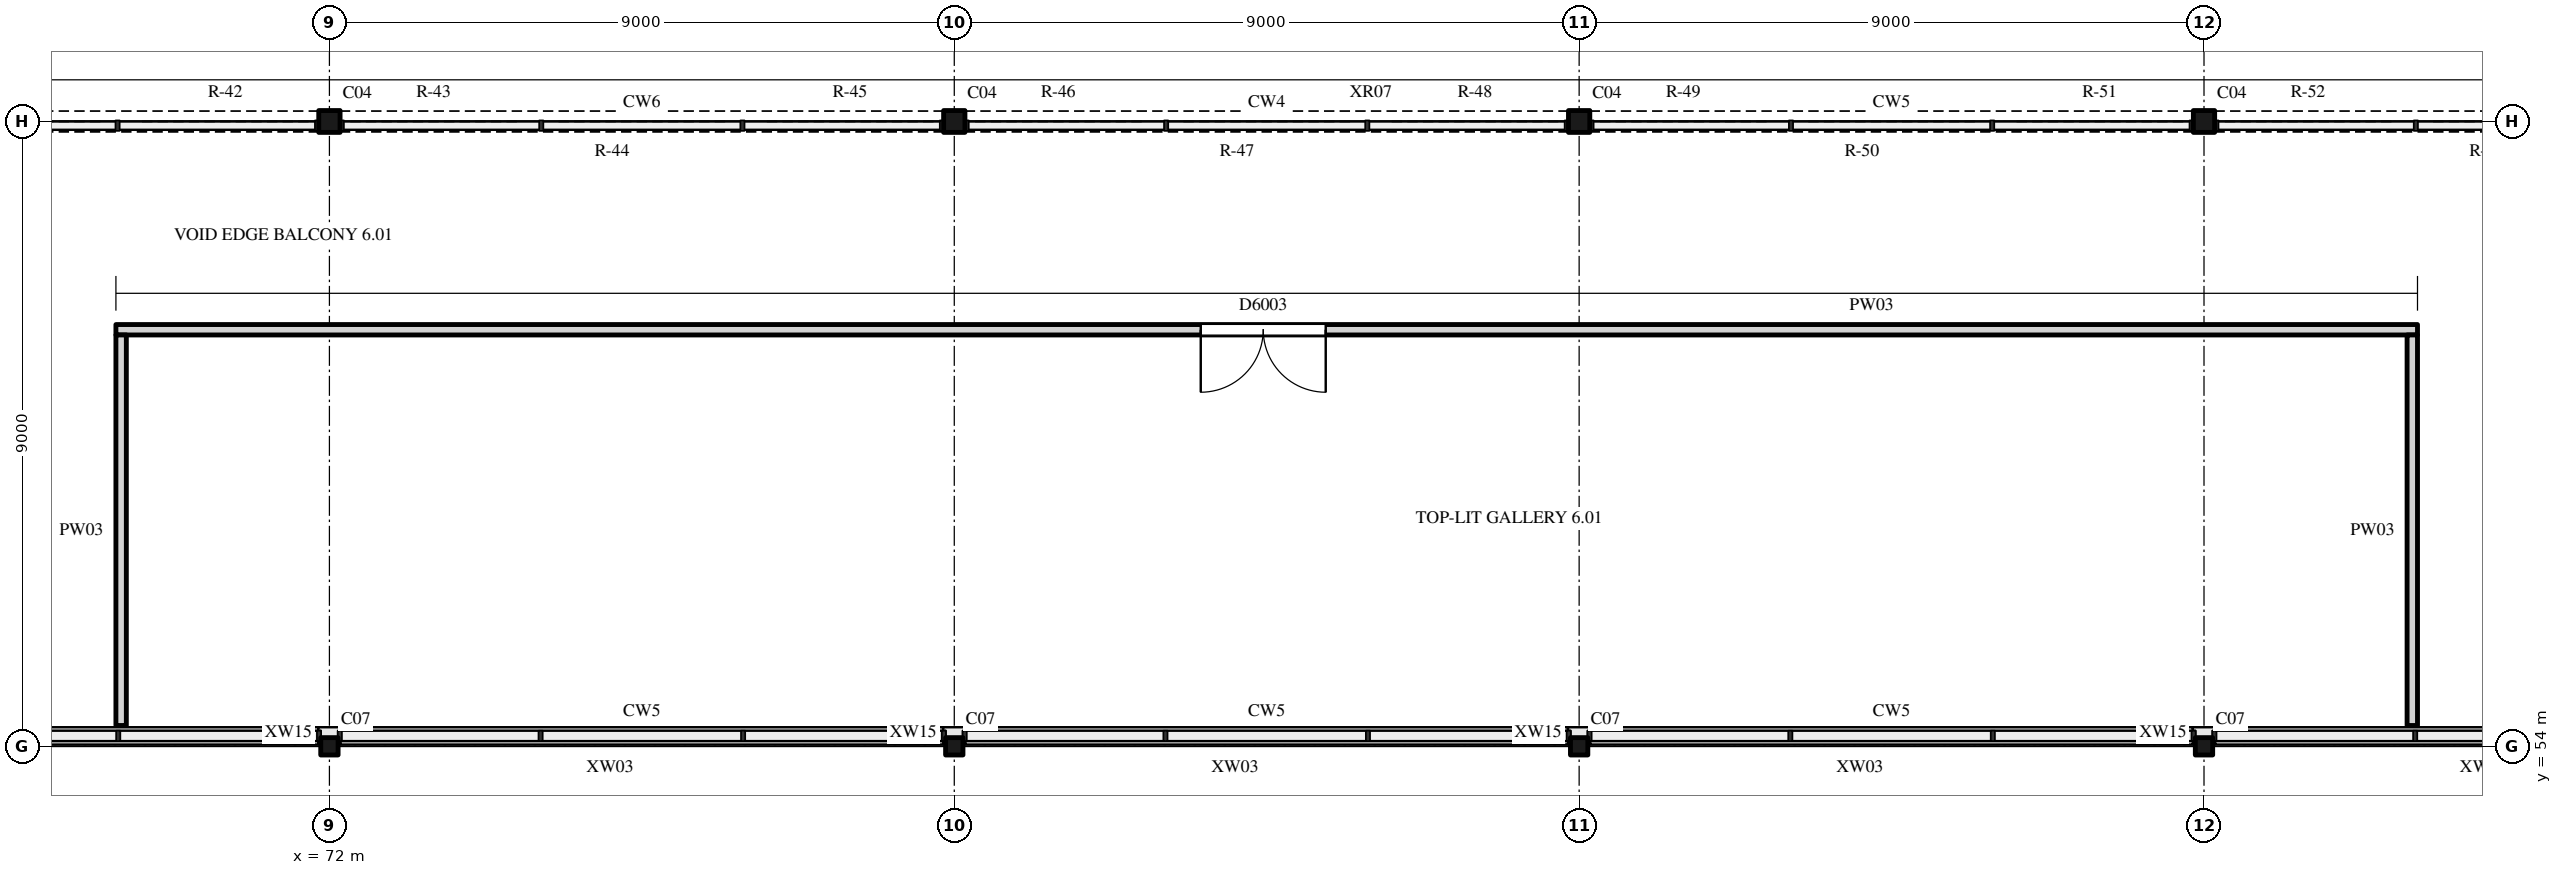
"""IFC4 building model, lengths in metres.
Left out: names, types, materials, properties, quantities, classifications, styles, units other than length and angle.
Written with IfcOpenShell. Run it as: python <this file> out.ifc"""

import sys

from ifc_helpers import new_model, si_unit, direction, frame, frame_2d, origin, origin_2d, place, context, subcontext, project, spatial, rectangle, hollow_rectangle, i_section, extrude, element, fill, save


model = new_model("IFC4")
c1 = context("Model", 3, precision=1e-05, world=origin(), true_north=direction((0.0, 1.0)))
c2 = subcontext(c1, "Body", "Model", "MODEL_VIEW")
j1 = project(units=[si_unit("LENGTHUNIT", "METRE"), si_unit("PLANEANGLEUNIT", "RADIAN")], contexts=[c1])
p1 = place(None, origin())
s1 = spatial("IfcSite", under=j1, at=p1, CompositionType="ELEMENT")
p2 = place(p1, origin())
s2 = spatial("IfcBuilding", under=s1, at=p2, CompositionType="ELEMENT")
p3 = place(p2, frame((0.0, 0.0, 36.0)))
s3 = spatial("IfcBuildingStorey", under=s2, at=p3, CompositionType="ELEMENT", Elevation=36.0)
for number, where, z_axis, x_axis in (
    (1, (72.0, 54.0, 0.0), (0.0, 0.0, 1.0), (1.0, 0.0, 0.0)),
    (2, (81.0, 54.0, 0.0), (0.0, 0.0, 1.0), (1.0, 0.0, 0.0)),
    (3, (90.0, 54.0, 0.0), (0.0, 0.0, 1.0), (1.0, 0.0, 0.0)),
    (4, (99.0, 54.0, 0.0), (0.0, 0.0, 1.0), (1.0, 0.0, 0.0)),
):
    element("IfcColumn", number, at=place(p3, frame(where, z_axis=z_axis, x_axis=x_axis)), inside=s3, PredefinedType="COLUMN", context=c2, shape_type="SweptSolid", body=[
        extrude(hollow_rectangle(XDim=0.25, YDim=0.25, WallThickness=0.009, InnerFilletRadius=0.013, OuterFilletRadius=0.022, at=origin_2d()), origin(), (0.0, 0.0, 1.0), 8.0),
    ])
for number, where, z_axis, x_axis in (
    (5, (72.0, 63.0, 0.0), (0.0, 0.0, 1.0), (1.0, 0.0, 0.0)),
    (6, (81.0, 63.0, 0.0), (0.0, 0.0, 1.0), (1.0, 0.0, 0.0)),
    (7, (90.0, 63.0, 0.0), (0.0, 0.0, 1.0), (1.0, 0.0, 0.0)),
    (8, (99.0, 63.0, 0.0), (0.0, 0.0, 1.0), (1.0, 0.0, 0.0)),
):
    element("IfcColumn", number, at=place(p3, frame(where, z_axis=z_axis, x_axis=x_axis)), inside=s3, PredefinedType="COLUMN", context=c2, shape_type="SweptSolid", body=[
        extrude(i_section(OverallWidth=0.307, OverallDepth=0.315, WebThickness=0.012, FlangeThickness=0.019, FilletRadius=0.017, at=origin_2d()), origin(), (0.0, 0.0, 1.0), 8.0),
    ])
p4 = place(p3, frame((63.197, 54.15, 0.0), z_axis=(0.0, 0.0, 1.0), x_axis=(1.0, 0.0, 0.0)))
e9 = element("IfcWall", 9, at=p4, inside=s3, PredefinedType="SOLIDWALL", context=c2, shape_type="SweptSolid", body=[
    extrude(rectangle(XDim=8.642, YDim=0.25, at=frame_2d((4.321, 0.0))), origin(), (0.0, 0.0, 1.0), 1.1),
])
for number, where, z_axis, x_axis in (
    (10, (72.161, 54.15, 0.0), (0.0, 0.0, 1.0), (1.0, 0.0, 0.0)),
    (11, (81.161, 54.15, 0.0), (0.0, 0.0, 1.0), (1.0, 0.0, 0.0)),
    (12, (90.161, 54.15, 0.0), (0.0, 0.0, 1.0), (1.0, 0.0, 0.0)),
):
    element("IfcWall", number, at=place(p3, frame(where, z_axis=z_axis, x_axis=x_axis)), inside=s3, PredefinedType="SOLIDWALL", context=c2, shape_type="SweptSolid", body=[
        extrude(rectangle(XDim=8.678, YDim=0.25, at=frame_2d((4.339, 0.0))), origin(), (0.0, 0.0, 1.0), 1.1),
    ])
p5 = place(p3, frame((99.161, 54.15, 0.0), z_axis=(0.0, 0.0, 1.0), x_axis=(1.0, 0.0, 0.0)))
e13 = element("IfcWall", 13, at=p5, inside=s3, PredefinedType="SOLIDWALL", context=c2, shape_type="SweptSolid", body=[
    extrude(rectangle(XDim=8.642, YDim=0.25, at=frame_2d((4.321, 0.0))), origin(), (0.0, 0.0, 1.0), 1.1),
])
for number, where, z_axis, x_axis in (
    (14, (71.839, 54.2, 0.0), (0.0, 0.0, 1.0), (1.0, 0.0, 0.0)),
    (15, (80.839, 54.2, 0.0), (0.0, 0.0, 1.0), (1.0, 0.0, 0.0)),
    (16, (89.839, 54.2, 0.0), (0.0, 0.0, 1.0), (1.0, 0.0, 0.0)),
    (17, (98.839, 54.2, 0.0), (0.0, 0.0, 1.0), (1.0, 0.0, 0.0)),
):
    element("IfcWall", number, at=place(p3, frame(where, z_axis=z_axis, x_axis=x_axis)), inside=s3, PredefinedType="SOLIDWALL", context=c2, shape_type="SweptSolid", body=[
        extrude(rectangle(XDim=0.322, YDim=0.15, at=frame_2d((0.161, 0.0))), origin(), (0.0, 0.0, 1.0), 1.1),
    ])
p6 = place(p3, frame((54.15, 63.0, 15.2), z_axis=(0.0, 0.0, 1.0), x_axis=(1.0, 0.0, 0.0)))
e18 = element("IfcWall", 18, at=p6, inside=s3, PredefinedType="SOLIDWALL", context=c2, shape_type="SweptSolid", body=[
    extrude(rectangle(XDim=62.7, YDim=0.3, at=frame_2d((31.35, 0.0))), origin(), (0.0, 0.0, 1.0), 0.9),
])
p7 = place(p6, frame((0.15, 0.0, 0.15)))
e19 = element("IfcOpeningElement", 19, at=p7, cuts=e18, PredefinedType="OPENING", context=c2, shape_type="SweptSolid", body=[
    extrude(rectangle(XDim=2.4, YDim=0.6, at=frame_2d((1.2, 0.3))), frame((0.0, 0.16, 0.0), z_axis=(0.0, -1.0, 0.0), x_axis=(1.0, 0.0, 0.0)), (0.0, 0.0, 1.0), 0.32),
])
p8 = place(p6, frame((3.15, 0.0, 0.15)))
e20 = element("IfcOpeningElement", 20, at=p8, cuts=e18, PredefinedType="OPENING", context=c2, shape_type="SweptSolid", body=[
    extrude(rectangle(XDim=2.4, YDim=0.6, at=frame_2d((1.2, 0.3))), frame((0.0, 0.16, 0.0), z_axis=(0.0, -1.0, 0.0), x_axis=(1.0, 0.0, 0.0)), (0.0, 0.0, 1.0), 0.32),
])
p9 = place(p6, frame((6.15, 0.0, 0.15)))
e21 = element("IfcOpeningElement", 21, at=p9, cuts=e18, PredefinedType="OPENING", context=c2, shape_type="SweptSolid", body=[
    extrude(rectangle(XDim=2.4, YDim=0.6, at=frame_2d((1.2, 0.3))), frame((0.0, 0.16, 0.0), z_axis=(0.0, -1.0, 0.0), x_axis=(1.0, 0.0, 0.0)), (0.0, 0.0, 1.0), 0.32),
])
p10 = place(p6, frame((9.15, 0.0, 0.15)))
e22 = element("IfcOpeningElement", 22, at=p10, cuts=e18, PredefinedType="OPENING", context=c2, shape_type="SweptSolid", body=[
    extrude(rectangle(XDim=2.4, YDim=0.6, at=frame_2d((1.2, 0.3))), frame((0.0, 0.16, 0.0), z_axis=(0.0, -1.0, 0.0), x_axis=(1.0, 0.0, 0.0)), (0.0, 0.0, 1.0), 0.32),
])
p11 = place(p6, frame((12.15, 0.0, 0.15)))
e23 = element("IfcOpeningElement", 23, at=p11, cuts=e18, PredefinedType="OPENING", context=c2, shape_type="SweptSolid", body=[
    extrude(rectangle(XDim=2.4, YDim=0.6, at=frame_2d((1.2, 0.3))), frame((0.0, 0.16, 0.0), z_axis=(0.0, -1.0, 0.0), x_axis=(1.0, 0.0, 0.0)), (0.0, 0.0, 1.0), 0.32),
])
p12 = place(p6, frame((15.15, 0.0, 0.15)))
e24 = element("IfcOpeningElement", 24, at=p12, cuts=e18, PredefinedType="OPENING", context=c2, shape_type="SweptSolid", body=[
    extrude(rectangle(XDim=2.4, YDim=0.6, at=frame_2d((1.2, 0.3))), frame((0.0, 0.16, 0.0), z_axis=(0.0, -1.0, 0.0), x_axis=(1.0, 0.0, 0.0)), (0.0, 0.0, 1.0), 0.32),
])
p13 = place(p6, frame((18.15, 0.0, 0.15)))
e25 = element("IfcOpeningElement", 25, at=p13, cuts=e18, PredefinedType="OPENING", context=c2, shape_type="SweptSolid", body=[
    extrude(rectangle(XDim=2.4, YDim=0.6, at=frame_2d((1.2, 0.3))), frame((0.0, 0.16, 0.0), z_axis=(0.0, -1.0, 0.0), x_axis=(1.0, 0.0, 0.0)), (0.0, 0.0, 1.0), 0.32),
])
p14 = place(p6, frame((21.15, 0.0, 0.15)))
e26 = element("IfcOpeningElement", 26, at=p14, cuts=e18, PredefinedType="OPENING", context=c2, shape_type="SweptSolid", body=[
    extrude(rectangle(XDim=2.4, YDim=0.6, at=frame_2d((1.2, 0.3))), frame((0.0, 0.16, 0.0), z_axis=(0.0, -1.0, 0.0), x_axis=(1.0, 0.0, 0.0)), (0.0, 0.0, 1.0), 0.32),
])
p15 = place(p6, frame((24.15, 0.0, 0.15)))
e27 = element("IfcOpeningElement", 27, at=p15, cuts=e18, PredefinedType="OPENING", context=c2, shape_type="SweptSolid", body=[
    extrude(rectangle(XDim=2.4, YDim=0.6, at=frame_2d((1.2, 0.3))), frame((0.0, 0.16, 0.0), z_axis=(0.0, -1.0, 0.0), x_axis=(1.0, 0.0, 0.0)), (0.0, 0.0, 1.0), 0.32),
])
p16 = place(p6, frame((27.15, 0.0, 0.15)))
e28 = element("IfcOpeningElement", 28, at=p16, cuts=e18, PredefinedType="OPENING", context=c2, shape_type="SweptSolid", body=[
    extrude(rectangle(XDim=2.4, YDim=0.6, at=frame_2d((1.2, 0.3))), frame((0.0, 0.16, 0.0), z_axis=(0.0, -1.0, 0.0), x_axis=(1.0, 0.0, 0.0)), (0.0, 0.0, 1.0), 0.32),
])
p17 = place(p6, frame((30.15, 0.0, 0.15)))
e29 = element("IfcOpeningElement", 29, at=p17, cuts=e18, PredefinedType="OPENING", context=c2, shape_type="SweptSolid", body=[
    extrude(rectangle(XDim=2.4, YDim=0.6, at=frame_2d((1.2, 0.3))), frame((0.0, 0.16, 0.0), z_axis=(0.0, -1.0, 0.0), x_axis=(1.0, 0.0, 0.0)), (0.0, 0.0, 1.0), 0.32),
])
p18 = place(p6, frame((33.15, 0.0, 0.15)))
e30 = element("IfcOpeningElement", 30, at=p18, cuts=e18, PredefinedType="OPENING", context=c2, shape_type="SweptSolid", body=[
    extrude(rectangle(XDim=2.4, YDim=0.6, at=frame_2d((1.2, 0.3))), frame((0.0, 0.16, 0.0), z_axis=(0.0, -1.0, 0.0), x_axis=(1.0, 0.0, 0.0)), (0.0, 0.0, 1.0), 0.32),
])
p19 = place(p6, frame((36.15, 0.0, 0.15)))
e31 = element("IfcOpeningElement", 31, at=p19, cuts=e18, PredefinedType="OPENING", context=c2, shape_type="SweptSolid", body=[
    extrude(rectangle(XDim=2.4, YDim=0.6, at=frame_2d((1.2, 0.3))), frame((0.0, 0.16, 0.0), z_axis=(0.0, -1.0, 0.0), x_axis=(1.0, 0.0, 0.0)), (0.0, 0.0, 1.0), 0.32),
])
p20 = place(p6, frame((39.15, 0.0, 0.15)))
e32 = element("IfcOpeningElement", 32, at=p20, cuts=e18, PredefinedType="OPENING", context=c2, shape_type="SweptSolid", body=[
    extrude(rectangle(XDim=2.4, YDim=0.6, at=frame_2d((1.2, 0.3))), frame((0.0, 0.16, 0.0), z_axis=(0.0, -1.0, 0.0), x_axis=(1.0, 0.0, 0.0)), (0.0, 0.0, 1.0), 0.32),
])
p21 = place(p6, frame((42.15, 0.0, 0.15)))
e33 = element("IfcOpeningElement", 33, at=p21, cuts=e18, PredefinedType="OPENING", context=c2, shape_type="SweptSolid", body=[
    extrude(rectangle(XDim=2.4, YDim=0.6, at=frame_2d((1.2, 0.3))), frame((0.0, 0.16, 0.0), z_axis=(0.0, -1.0, 0.0), x_axis=(1.0, 0.0, 0.0)), (0.0, 0.0, 1.0), 0.32),
])
p22 = place(p6, frame((45.15, 0.0, 0.15)))
e34 = element("IfcOpeningElement", 34, at=p22, cuts=e18, PredefinedType="OPENING", context=c2, shape_type="SweptSolid", body=[
    extrude(rectangle(XDim=2.4, YDim=0.6, at=frame_2d((1.2, 0.3))), frame((0.0, 0.16, 0.0), z_axis=(0.0, -1.0, 0.0), x_axis=(1.0, 0.0, 0.0)), (0.0, 0.0, 1.0), 0.32),
])
p23 = place(p6, frame((48.15, 0.0, 0.15)))
e35 = element("IfcOpeningElement", 35, at=p23, cuts=e18, PredefinedType="OPENING", context=c2, shape_type="SweptSolid", body=[
    extrude(rectangle(XDim=2.4, YDim=0.6, at=frame_2d((1.2, 0.3))), frame((0.0, 0.16, 0.0), z_axis=(0.0, -1.0, 0.0), x_axis=(1.0, 0.0, 0.0)), (0.0, 0.0, 1.0), 0.32),
])
p24 = place(p6, frame((51.15, 0.0, 0.15)))
e36 = element("IfcOpeningElement", 36, at=p24, cuts=e18, PredefinedType="OPENING", context=c2, shape_type="SweptSolid", body=[
    extrude(rectangle(XDim=2.4, YDim=0.6, at=frame_2d((1.2, 0.3))), frame((0.0, 0.16, 0.0), z_axis=(0.0, -1.0, 0.0), x_axis=(1.0, 0.0, 0.0)), (0.0, 0.0, 1.0), 0.32),
])
p25 = place(p6, frame((54.15, 0.0, 0.15)))
e37 = element("IfcOpeningElement", 37, at=p25, cuts=e18, PredefinedType="OPENING", context=c2, shape_type="SweptSolid", body=[
    extrude(rectangle(XDim=2.4, YDim=0.6, at=frame_2d((1.2, 0.3))), frame((0.0, 0.16, 0.0), z_axis=(0.0, -1.0, 0.0), x_axis=(1.0, 0.0, 0.0)), (0.0, 0.0, 1.0), 0.32),
])
p26 = place(p6, frame((57.15, 0.0, 0.15)))
e38 = element("IfcOpeningElement", 38, at=p26, cuts=e18, PredefinedType="OPENING", context=c2, shape_type="SweptSolid", body=[
    extrude(rectangle(XDim=2.4, YDim=0.6, at=frame_2d((1.2, 0.3))), frame((0.0, 0.16, 0.0), z_axis=(0.0, -1.0, 0.0), x_axis=(1.0, 0.0, 0.0)), (0.0, 0.0, 1.0), 0.32),
])
p27 = place(p6, frame((60.15, 0.0, 0.15)))
e39 = element("IfcOpeningElement", 39, at=p27, cuts=e18, PredefinedType="OPENING", context=c2, shape_type="SweptSolid", body=[
    extrude(rectangle(XDim=2.4, YDim=0.6, at=frame_2d((1.2, 0.3))), frame((0.0, 0.16, 0.0), z_axis=(0.0, -1.0, 0.0), x_axis=(1.0, 0.0, 0.0)), (0.0, 0.0, 1.0), 0.32),
])
p28 = place(p3, frame((68.925, 60.0, 0.0), z_axis=(0.0, 0.0, 1.0), x_axis=(1.0, 0.0, 0.0)))
e40 = element("IfcWall", 40, at=p28, inside=s3, PredefinedType="PARTITIONING", context=c2, shape_type="SweptSolid", body=[
    extrude(rectangle(XDim=33.15, YDim=0.15, at=frame_2d((16.575, 0.0))), origin(), (0.0, 0.0, 1.0), 7.744),
])
p29 = place(p28, frame((15.625, 0.0, 0.0)))
e41 = element("IfcOpeningElement", 41, at=p29, cuts=e40, PredefinedType="OPENING", context=c2, shape_type="SweptSolid", body=[
    extrude(rectangle(XDim=1.8, YDim=2.4, at=frame_2d((0.9, 1.2))), frame((0.0, 0.085, 0.0), z_axis=(0.0, -1.0, 0.0), x_axis=(1.0, 0.0, 0.0)), (0.0, 0.0, 1.0), 0.17),
])
for number, where, z_axis, x_axis in (
    (42, (69.0, 54.3, 0.0), (0.0, 0.0, 1.0), (0.0, 1.0, 0.0)),
    (43, (102.0, 54.3, 0.0), (0.0, 0.0, 1.0), (0.0, 1.0, 0.0)),
):
    element("IfcWall", number, at=place(p3, frame(where, z_axis=z_axis, x_axis=x_axis)), inside=s3, PredefinedType="PARTITIONING", context=c2, shape_type="SweptSolid", body=[
        extrude(rectangle(XDim=5.625, YDim=0.15, at=frame_2d((2.812, 0.0))), origin(), (0.0, 0.0, 1.0), 7.744),
    ])
p30 = place(p11, origin())
e44 = element("IfcWindow", 44, at=p30, inside=s3, PartitioningType="SINGLE_PANEL", PredefinedType="SKYLIGHT", context=c2, shape_type="SweptSolid", body=[
    extrude(rectangle(XDim=2.4, YDim=0.6, at=frame_2d((1.2, 0.3))), frame((0.0, 0.03, 0.0), z_axis=(0.0, -1.0, 0.0), x_axis=(1.0, 0.0, 0.0)), (0.0, 0.0, 1.0), 0.06),
])
fill(e23, e44)
p31 = place(p12, origin())
e45 = element("IfcWindow", 45, at=p31, inside=s3, PartitioningType="SINGLE_PANEL", PredefinedType="SKYLIGHT", context=c2, shape_type="SweptSolid", body=[
    extrude(rectangle(XDim=2.4, YDim=0.6, at=frame_2d((1.2, 0.3))), frame((0.0, 0.03, 0.0), z_axis=(0.0, -1.0, 0.0), x_axis=(1.0, 0.0, 0.0)), (0.0, 0.0, 1.0), 0.06),
])
fill(e24, e45)
p32 = place(p13, origin())
e46 = element("IfcWindow", 46, at=p32, inside=s3, PartitioningType="SINGLE_PANEL", PredefinedType="SKYLIGHT", context=c2, shape_type="SweptSolid", body=[
    extrude(rectangle(XDim=2.4, YDim=0.6, at=frame_2d((1.2, 0.3))), frame((0.0, 0.03, 0.0), z_axis=(0.0, -1.0, 0.0), x_axis=(1.0, 0.0, 0.0)), (0.0, 0.0, 1.0), 0.06),
])
fill(e25, e46)
p33 = place(p14, origin())
e47 = element("IfcWindow", 47, at=p33, inside=s3, PartitioningType="SINGLE_PANEL", PredefinedType="SKYLIGHT", context=c2, shape_type="SweptSolid", body=[
    extrude(rectangle(XDim=2.4, YDim=0.6, at=frame_2d((1.2, 0.3))), frame((0.0, 0.03, 0.0), z_axis=(0.0, -1.0, 0.0), x_axis=(1.0, 0.0, 0.0)), (0.0, 0.0, 1.0), 0.06),
])
fill(e26, e47)
p34 = place(p15, origin())
e48 = element("IfcWindow", 48, at=p34, inside=s3, PartitioningType="SINGLE_PANEL", PredefinedType="SKYLIGHT", context=c2, shape_type="SweptSolid", body=[
    extrude(rectangle(XDim=2.4, YDim=0.6, at=frame_2d((1.2, 0.3))), frame((0.0, 0.03, 0.0), z_axis=(0.0, -1.0, 0.0), x_axis=(1.0, 0.0, 0.0)), (0.0, 0.0, 1.0), 0.06),
])
fill(e27, e48)
p35 = place(p16, origin())
e49 = element("IfcWindow", 49, at=p35, inside=s3, PartitioningType="SINGLE_PANEL", PredefinedType="SKYLIGHT", context=c2, shape_type="SweptSolid", body=[
    extrude(rectangle(XDim=2.4, YDim=0.6, at=frame_2d((1.2, 0.3))), frame((0.0, 0.03, 0.0), z_axis=(0.0, -1.0, 0.0), x_axis=(1.0, 0.0, 0.0)), (0.0, 0.0, 1.0), 0.06),
])
fill(e28, e49)
p36 = place(p17, origin())
e50 = element("IfcWindow", 50, at=p36, inside=s3, PartitioningType="SINGLE_PANEL", PredefinedType="SKYLIGHT", context=c2, shape_type="SweptSolid", body=[
    extrude(rectangle(XDim=2.4, YDim=0.6, at=frame_2d((1.2, 0.3))), frame((0.0, 0.03, 0.0), z_axis=(0.0, -1.0, 0.0), x_axis=(1.0, 0.0, 0.0)), (0.0, 0.0, 1.0), 0.06),
])
fill(e29, e50)
p37 = place(p18, origin())
e51 = element("IfcWindow", 51, at=p37, inside=s3, PartitioningType="SINGLE_PANEL", PredefinedType="SKYLIGHT", context=c2, shape_type="SweptSolid", body=[
    extrude(rectangle(XDim=2.4, YDim=0.6, at=frame_2d((1.2, 0.3))), frame((0.0, 0.03, 0.0), z_axis=(0.0, -1.0, 0.0), x_axis=(1.0, 0.0, 0.0)), (0.0, 0.0, 1.0), 0.06),
])
fill(e30, e51)
p38 = place(p19, origin())
e52 = element("IfcWindow", 52, at=p38, inside=s3, PartitioningType="SINGLE_PANEL", PredefinedType="SKYLIGHT", context=c2, shape_type="SweptSolid", body=[
    extrude(rectangle(XDim=2.4, YDim=0.6, at=frame_2d((1.2, 0.3))), frame((0.0, 0.03, 0.0), z_axis=(0.0, -1.0, 0.0), x_axis=(1.0, 0.0, 0.0)), (0.0, 0.0, 1.0), 0.06),
])
fill(e31, e52)
p39 = place(p20, origin())
e53 = element("IfcWindow", 53, at=p39, inside=s3, PartitioningType="SINGLE_PANEL", PredefinedType="SKYLIGHT", context=c2, shape_type="SweptSolid", body=[
    extrude(rectangle(XDim=2.4, YDim=0.6, at=frame_2d((1.2, 0.3))), frame((0.0, 0.03, 0.0), z_axis=(0.0, -1.0, 0.0), x_axis=(1.0, 0.0, 0.0)), (0.0, 0.0, 1.0), 0.06),
])
fill(e32, e53)
p40 = place(p21, origin())
e54 = element("IfcWindow", 54, at=p40, inside=s3, PartitioningType="SINGLE_PANEL", PredefinedType="SKYLIGHT", context=c2, shape_type="SweptSolid", body=[
    extrude(rectangle(XDim=2.4, YDim=0.6, at=frame_2d((1.2, 0.3))), frame((0.0, 0.03, 0.0), z_axis=(0.0, -1.0, 0.0), x_axis=(1.0, 0.0, 0.0)), (0.0, 0.0, 1.0), 0.06),
])
fill(e33, e54)
p41 = place(p22, origin())
e55 = element("IfcWindow", 55, at=p41, inside=s3, PartitioningType="SINGLE_PANEL", PredefinedType="SKYLIGHT", context=c2, shape_type="SweptSolid", body=[
    extrude(rectangle(XDim=2.4, YDim=0.6, at=frame_2d((1.2, 0.3))), frame((0.0, 0.03, 0.0), z_axis=(0.0, -1.0, 0.0), x_axis=(1.0, 0.0, 0.0)), (0.0, 0.0, 1.0), 0.06),
])
fill(e34, e55)
p42 = place(p23, origin())
e56 = element("IfcWindow", 56, at=p42, inside=s3, PartitioningType="SINGLE_PANEL", PredefinedType="SKYLIGHT", context=c2, shape_type="SweptSolid", body=[
    extrude(rectangle(XDim=2.4, YDim=0.6, at=frame_2d((1.2, 0.3))), frame((0.0, 0.03, 0.0), z_axis=(0.0, -1.0, 0.0), x_axis=(1.0, 0.0, 0.0)), (0.0, 0.0, 1.0), 0.06),
])
fill(e35, e56)
p43 = place(p29, origin())
e57 = element("IfcDoor", 57, at=p43, inside=s3, OperationType="DOUBLE_DOOR_SINGLE_SWING", PredefinedType="DOOR", context=c2, shape_type="SweptSolid", body=[
    extrude(rectangle(XDim=1.8, YDim=2.4, at=frame_2d((0.9, 1.2))), frame((0.0, 0.025, 0.0), z_axis=(0.0, -1.0, 0.0), x_axis=(1.0, 0.0, 0.0)), (0.0, 0.0, 1.0), 0.05),
])
fill(e41, e57)
save(model, sys.argv[1])
